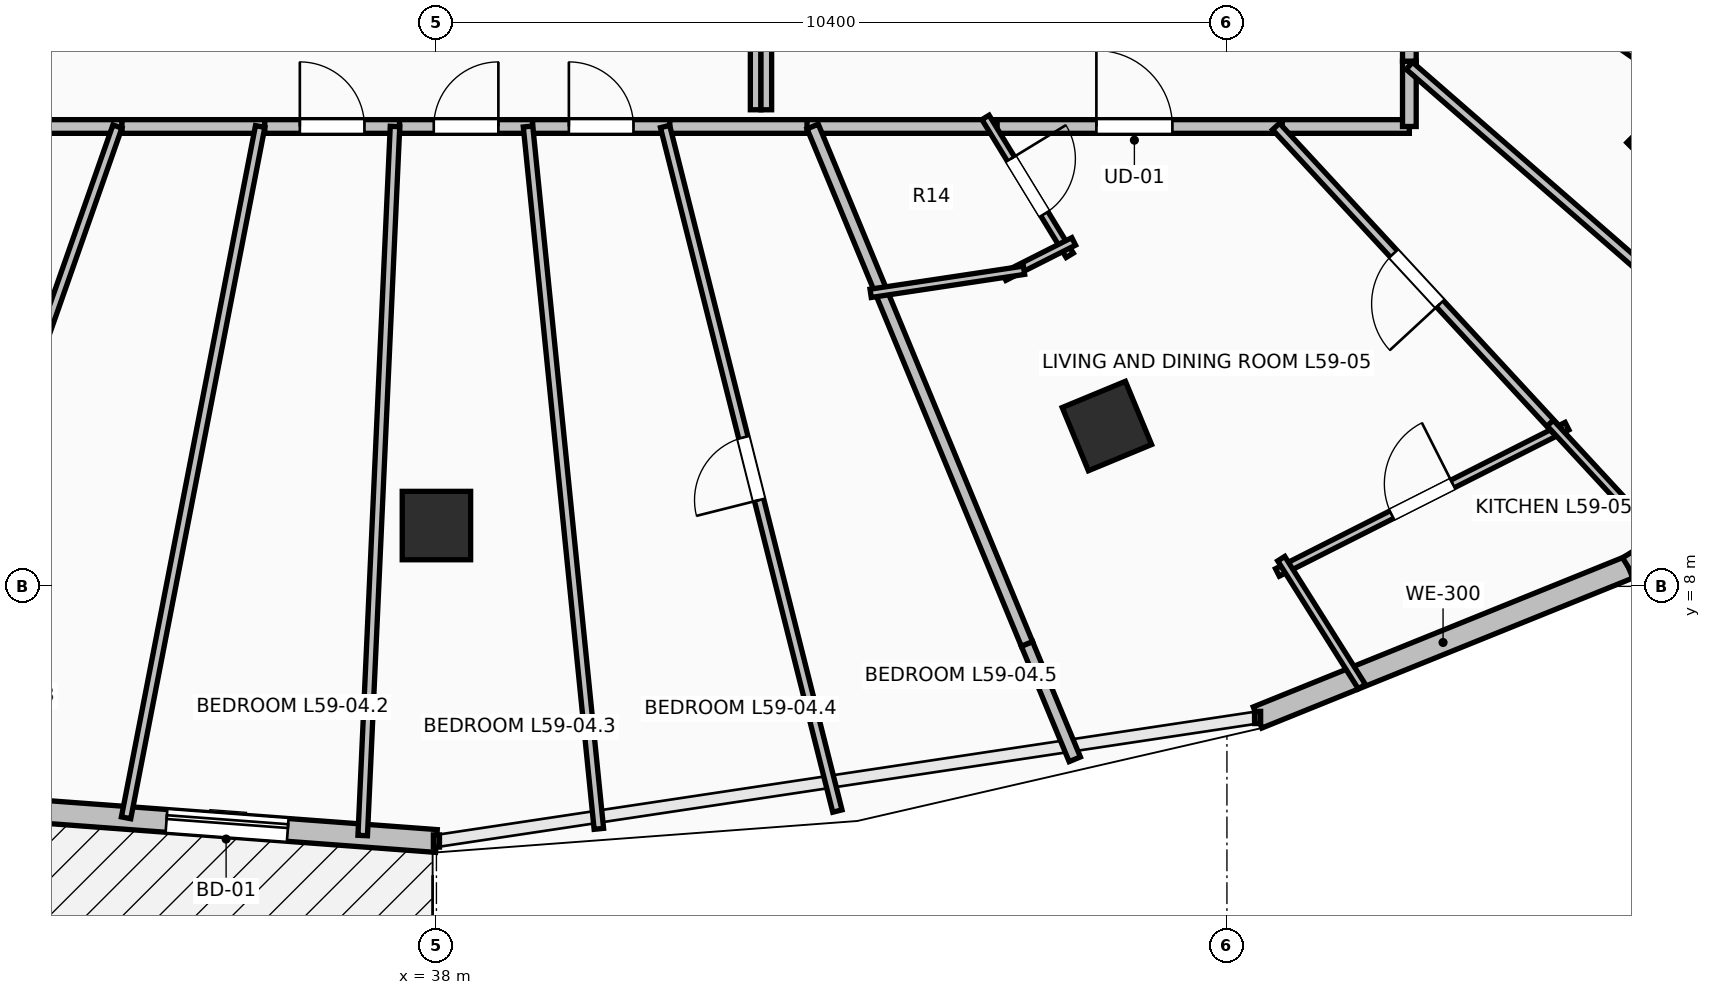
"""IFC4 building model, lengths in metres.
Left out: names, types, materials, properties, quantities, classifications, styles, units other than length and angle.
Written with IfcOpenShell. Run it as: python <this file> out.ifc"""

import sys

from ifc_helpers import new_model, si_unit, direction, frame, frame_2d, origin, origin_2d, place, context, subcontext, project, spatial, rectangle, extrude, element, fill, save


model = new_model("IFC4")
c1 = context("Model", 3, precision=1e-05, world=origin(), true_north=direction((0.0, 1.0)))
c2 = subcontext(c1, "Body", "Model", "MODEL_VIEW")
j1 = project(units=[si_unit("LENGTHUNIT", "METRE"), si_unit("PLANEANGLEUNIT", "RADIAN")], contexts=[c1])
p1 = place(None, origin())
s1 = spatial("IfcSite", under=j1, at=p1, CompositionType="ELEMENT")
p2 = place(p1, origin())
s2 = spatial("IfcBuilding", under=s1, at=p2, CompositionType="ELEMENT")
p3 = place(p2, frame((0.0, 0.0, 217.85)))
s3 = spatial("IfcBuildingStorey", under=s2, at=p3, CompositionType="ELEMENT", Elevation=217.85)
for number, where, z_axis, x_axis in (
    (1, (38.0, 8.8, 0.0), (0.0, 0.0, 1.0), (0.0, -1.0, 0.0)),
    (2, (46.821, 10.109, 0.0), (0.0, 0.0, 1.0), (0.383, -0.924, 0.0)),
    (3, (54.299, 13.838, 0.0), (0.0, 0.0, 1.0), (0.707, -0.707, 0.0)),
):
    element("IfcColumn", number, at=place(p3, frame(where, z_axis=z_axis, x_axis=x_axis)), inside=s3, PredefinedType="COLUMN", context=c2, shape_type="SweptSolid", body=[
        extrude(rectangle(XDim=0.9, YDim=0.9, at=origin_2d()), origin(), (0.0, 0.0, 1.0), 3.55),
    ])
p4 = place(p3, frame((32.493, 5.06, 0.0), z_axis=(0.0, 0.0, 1.0), x_axis=(0.997234968529, -0.074312970214, 0.0)))
e4 = element("IfcWall", 4, at=p4, inside=s3, PredefinedType="STANDARD", context=c2, shape_type="SweptSolid", body=[
    extrude(rectangle(XDim=5.523, YDim=0.3, at=frame_2d((2.761, 0.0))), origin(), (0.0, 0.0, 1.0), 3.29),
])
p5 = place(p4, frame((1.961, 0.0, 0.0)))
e5 = element("IfcOpeningElement", 5, at=p5, cuts=e4, PredefinedType="OPENING", context=c2, shape_type="SweptSolid", body=[
    extrude(rectangle(XDim=1.6, YDim=2.3, at=frame_2d((0.8, 1.15))), frame((0.0, 0.165, 0.0), z_axis=(0.0, -1.0, 0.0), x_axis=(1.0, 0.0, 0.0)), (0.0, 0.0, 1.0), 0.33),
])
p6 = place(p3, frame((48.803, 6.275, 0.0), z_axis=(0.0, 0.0, 1.0), x_axis=(0.927111094334, 0.374786630981, 0.0)))
e6 = element("IfcWall", 6, at=p6, inside=s3, PredefinedType="STANDARD", context=c2, shape_type="SweptSolid", body=[
    extrude(rectangle(XDim=5.264, YDim=0.3, at=frame_2d((2.632, 0.0))), origin(), (0.0, 0.0, 1.0), 3.29),
])
p7 = place(p3, frame((53.684, 8.248, 0.0), z_axis=(0.0, 0.0, 1.0), x_axis=(0.849647657754, 0.527350791858, 0.0)))
e7 = element("IfcWall", 7, at=p7, inside=s3, PredefinedType="STANDARD", context=c2, shape_type="SweptSolid", body=[
    extrude(rectangle(XDim=5.035, YDim=0.3, at=frame_2d((2.518, 0.0))), origin(), (0.0, 0.0, 1.0), 3.29),
])
p8 = place(p7, frame((1.621, 0.0, 0.85)))
e8 = element("IfcOpeningElement", 8, at=p8, cuts=e7, PredefinedType="OPENING", context=c2, shape_type="SweptSolid", body=[
    extrude(rectangle(XDim=1.2, YDim=1.95, at=frame_2d((0.6, 0.975))), frame((0.0, 0.165, 0.0), z_axis=(0.0, -1.0, 0.0), x_axis=(1.0, 0.0, 0.0)), (0.0, 0.0, 1.0), 0.33),
])
p9 = place(p7, frame((3.636, 0.0, 0.85)))
e9 = element("IfcOpeningElement", 9, at=p9, cuts=e7, PredefinedType="OPENING", context=c2, shape_type="SweptSolid", body=[
    extrude(rectangle(XDim=1.2, YDim=1.95, at=frame_2d((0.6, 0.975))), frame((0.0, 0.165, 0.0), z_axis=(0.0, -1.0, 0.0), x_axis=(1.0, 0.0, 0.0)), (0.0, 0.0, 1.0), 0.33),
])
p10 = place(p3, frame((29.954, 14.05, 0.0), z_axis=(0.0, 0.0, 1.0), x_axis=(1.0, 0.0, 0.0)))
e10 = element("IfcWall", 10, at=p10, inside=s3, PredefinedType="PARTITIONING", context=c2, shape_type="SweptSolid", body=[
    extrude(rectangle(XDim=3.909, YDim=0.18, at=frame_2d((1.955, 0.0))), origin(), (0.0, 0.0, 1.0), 2.924),
])
p11 = place(p10, frame((1.455, 0.0, 0.0)))
e11 = element("IfcOpeningElement", 11, at=p11, cuts=e10, PredefinedType="OPENING", context=c2, shape_type="SweptSolid", body=[
    extrude(rectangle(XDim=1.0, YDim=2.15, at=frame_2d((0.5, 1.075))), frame((0.0, 0.105, 0.0), z_axis=(0.0, -1.0, 0.0), x_axis=(1.0, 0.0, 0.0)), (0.0, 0.0, 1.0), 0.21),
])
p12 = place(p3, frame((33.863, 14.05, 0.0), z_axis=(0.0, 0.0, 1.0), x_axis=(1.0, 0.0, 0.0)))
e12 = element("IfcWall", 12, at=p12, inside=s3, PredefinedType="PARTITIONING", context=c2, shape_type="SweptSolid", body=[
    extrude(rectangle(XDim=1.878, YDim=0.18, at=frame_2d((0.939, 0.0))), origin(), (0.0, 0.0, 1.0), 2.924),
])
p13 = place(p3, frame((35.741, 14.05, 0.0), z_axis=(0.0, 0.0, 1.0), x_axis=(1.0, 0.0, 0.0)))
e13 = element("IfcWall", 13, at=p13, inside=s3, PredefinedType="PARTITIONING", context=c2, shape_type="SweptSolid", body=[
    extrude(rectangle(XDim=1.774, YDim=0.18, at=frame_2d((0.887, 0.0))), origin(), (0.0, 0.0, 1.0), 2.924),
])
p14 = place(p13, frame((0.462, 0.0, 0.0)))
e14 = element("IfcOpeningElement", 14, at=p14, cuts=e13, PredefinedType="OPENING", context=c2, shape_type="SweptSolid", body=[
    extrude(rectangle(XDim=0.85, YDim=2.1, at=frame_2d((0.425, 1.05))), frame((0.0, 0.105, 0.0), z_axis=(0.0, -1.0, 0.0), x_axis=(1.0, 0.0, 0.0)), (0.0, 0.0, 1.0), 0.21),
])
p15 = place(p3, frame((37.515, 14.05, 0.0), z_axis=(0.0, 0.0, 1.0), x_axis=(1.0, 0.0, 0.0)))
e15 = element("IfcWall", 15, at=p15, inside=s3, PredefinedType="PARTITIONING", context=c2, shape_type="SweptSolid", body=[
    extrude(rectangle(XDim=1.75, YDim=0.18, at=frame_2d((0.875, 0.0))), origin(), (0.0, 0.0, 1.0), 2.924),
])
p16 = place(p15, frame((0.45, 0.0, 0.0)))
e16 = element("IfcOpeningElement", 16, at=p16, cuts=e15, PredefinedType="OPENING", context=c2, shape_type="SweptSolid", body=[
    extrude(rectangle(XDim=0.85, YDim=2.1, at=frame_2d((0.425, 1.05))), frame((0.0, 0.105, 0.0), z_axis=(0.0, -1.0, 0.0), x_axis=(1.0, 0.0, 0.0)), (0.0, 0.0, 1.0), 0.21),
])
p17 = place(p3, frame((39.265, 14.05, 0.0), z_axis=(0.0, 0.0, 1.0), x_axis=(1.0, 0.0, 0.0)))
e17 = element("IfcWall", 17, at=p17, inside=s3, PredefinedType="PARTITIONING", context=c2, shape_type="SweptSolid", body=[
    extrude(rectangle(XDim=1.805, YDim=0.18, at=frame_2d((0.903, 0.0))), origin(), (0.0, 0.0, 1.0), 3.29),
])
p18 = place(p17, frame((0.478, 0.0, 0.0)))
e18 = element("IfcOpeningElement", 18, at=p18, cuts=e17, PredefinedType="OPENING", context=c2, shape_type="SweptSolid", body=[
    extrude(rectangle(XDim=0.85, YDim=2.1, at=frame_2d((0.425, 1.05))), frame((0.0, 0.105, 0.0), z_axis=(0.0, -1.0, 0.0), x_axis=(1.0, 0.0, 0.0)), (0.0, 0.0, 1.0), 0.21),
])
p19 = place(p3, frame((41.07, 14.05, 0.0), z_axis=(0.0, 0.0, 1.0), x_axis=(1.0, 0.0, 0.0)))
e19 = element("IfcWall", 19, at=p19, inside=s3, PredefinedType="PARTITIONING", context=c2, shape_type="SweptSolid", body=[
    extrude(rectangle(XDim=1.945, YDim=0.18, at=frame_2d((0.972, 0.0))), origin(), (0.0, 0.0, 1.0), 3.29),
])
p20 = place(p3, frame((45.237, 14.05, 0.0), z_axis=(0.0, 0.0, 1.0), x_axis=(1.0, 0.0, 0.0)))
e20 = element("IfcWall", 20, at=p20, inside=s3, PredefinedType="PARTITIONING", context=c2, shape_type="SweptSolid", body=[
    extrude(rectangle(XDim=3.891, YDim=0.18, at=frame_2d((1.945, 0.0))), origin(), (0.0, 0.0, 1.0), 2.482),
])
p21 = place(p20, frame((1.446, 0.0, 0.0)))
e21 = element("IfcOpeningElement", 21, at=p21, cuts=e20, PredefinedType="OPENING", context=c2, shape_type="SweptSolid", body=[
    extrude(rectangle(XDim=1.0, YDim=2.15, at=frame_2d((0.5, 1.075))), frame((0.0, 0.105, 0.0), z_axis=(0.0, -1.0, 0.0), x_axis=(1.0, 0.0, 0.0)), (0.0, 0.0, 1.0), 0.21),
])
p22 = place(p3, frame((42.875, 14.05, 0.0), z_axis=(0.0, 0.0, 1.0), x_axis=(1.0, 0.0, 0.0)))
e22 = element("IfcWall", 22, at=p22, inside=s3, PredefinedType="PARTITIONING", context=c2, shape_type="SweptSolid", body=[
    extrude(rectangle(XDim=2.502, YDim=0.18, at=frame_2d((1.251, 0.0))), origin(), (0.0, 0.0, 1.0), 2.482),
])
p23 = place(p3, frame((49.128, 14.05, 0.0), z_axis=(0.0, 0.0, 1.0), x_axis=(1.0, 0.0, 0.0)))
e23 = element("IfcWall", 23, at=p23, inside=s3, PredefinedType="PARTITIONING", context=c2, shape_type="SweptSolid", body=[
    extrude(rectangle(XDim=1.672, YDim=0.18, at=frame_2d((0.836, 0.0))), origin(), (0.0, 0.0, 1.0), 2.979),
])
p24 = place(p3, frame((50.8, 14.05, 0.0), z_axis=(0.0, 0.0, 1.0), x_axis=(0.0, 1.0, 0.0)))
e24 = element("IfcWall", 24, at=p24, inside=s3, PredefinedType="PARTITIONING", context=c2, shape_type="SweptSolid", body=[
    extrude(rectangle(XDim=0.859, YDim=0.18, at=frame_2d((0.429, 0.0))), origin(), (0.0, 0.0, 1.0), 2.979),
])
p25 = place(p3, frame((50.8, 14.909, 0.0), z_axis=(0.0, 0.0, 1.0), x_axis=(0.0, 1.0, 0.0)))
e25 = element("IfcWall", 25, at=p25, inside=s3, PredefinedType="PARTITIONING", context=c2, shape_type="SweptSolid", body=[
    extrude(rectangle(XDim=2.23, YDim=0.18, at=frame_2d((1.115, 0.0))), origin(), (0.0, 0.0, 1.0), 2.482),
])
p26 = place(p25, frame((0.69, 0.0, 0.0)))
e26 = element("IfcOpeningElement", 26, at=p26, cuts=e25, PredefinedType="OPENING", context=c2, shape_type="SweptSolid", body=[
    extrude(rectangle(XDim=0.85, YDim=2.1, at=frame_2d((0.425, 1.05))), frame((0.0, 0.105, 0.0), z_axis=(0.0, -1.0, 0.0), x_axis=(1.0, 0.0, 0.0)), (0.0, 0.0, 1.0), 0.21),
])
p27 = place(p3, frame((31.381, 7.152, 0.0), z_axis=(0.0, 0.0, 1.0), x_axis=(0.331275500224, 0.943534070901, 0.0)))
e27 = element("IfcWall", 27, at=p27, inside=s3, PredefinedType="PARTITIONING", context=c2, shape_type="SweptSolid", body=[
    extrude(rectangle(XDim=7.311, YDim=0.125, at=frame_2d((3.655, 0.0))), origin(), (0.0, 0.0, 1.0), 2.824),
])
p28 = place(p27, frame((3.205, 0.0, 0.0)))
e28 = element("IfcOpeningElement", 28, at=p28, cuts=e27, PredefinedType="OPENING", context=c2, shape_type="SweptSolid", body=[
    extrude(rectangle(XDim=0.9, YDim=2.1, at=frame_2d((0.45, 1.05))), frame((0.0, 0.077, 0.0), z_axis=(0.0, -1.0, 0.0), x_axis=(1.0, 0.0, 0.0)), (0.0, 0.0, 1.0), 0.155),
])
p29 = place(p3, frame((33.917, 4.955, 0.0), z_axis=(0.0, 0.0, 1.0), x_axis=(0.190396351082, 0.981707303372, 0.0)))
e29 = element("IfcWall", 29, at=p29, inside=s3, PredefinedType="PARTITIONING", context=c2, shape_type="SweptSolid", body=[
    extrude(rectangle(XDim=9.264, YDim=0.125, at=frame_2d((4.632, 0.0))), origin(), (0.0, 0.0, 1.0), 2.824),
])
p30 = place(p3, frame((37.03, 4.722, 0.0), z_axis=(0.0, 0.0, 1.0), x_axis=(0.045519142468, 0.998963466634, 0.0)))
e30 = element("IfcWall", 30, at=p30, inside=s3, PredefinedType="PARTITIONING", context=c2, shape_type="SweptSolid", body=[
    extrude(rectangle(XDim=9.338, YDim=0.125, at=frame_2d((4.669, 0.0))), origin(), (0.0, 0.0, 1.0), 2.824),
])
p31 = place(p3, frame((40.137, 4.81, 0.0), z_axis=(0.0, 0.0, 1.0), x_axis=(-0.100344404998, 0.994952762892, 0.0)))
e31 = element("IfcWall", 31, at=p31, inside=s3, PredefinedType="PARTITIONING", context=c2, shape_type="SweptSolid", body=[
    extrude(rectangle(XDim=9.287, YDim=0.125, at=frame_2d((4.644, 0.0))), origin(), (0.0, 0.0, 1.0), 2.482),
])
p32 = place(p3, frame((43.275, 5.044, 0.0), z_axis=(0.0, 0.0, 1.0), x_axis=(-0.244087876961, 0.969753117201, 0.0)))
e32 = element("IfcWall", 32, at=p32, inside=s3, PredefinedType="PARTITIONING", context=c2, shape_type="SweptSolid", body=[
    extrude(rectangle(XDim=9.287, YDim=0.125, at=frame_2d((4.644, 0.0))), origin(), (0.0, 0.0, 1.0), 2.482),
])
p33 = place(p32, frame((4.219, 0.0, 0.0)))
e33 = element("IfcOpeningElement", 33, at=p33, cuts=e32, PredefinedType="OPENING", context=c2, shape_type="SweptSolid", body=[
    extrude(rectangle(XDim=0.85, YDim=2.1, at=frame_2d((0.425, 1.05))), frame((0.0, 0.077, 0.0), z_axis=(0.0, -1.0, 0.0), x_axis=(1.0, 0.0, 0.0)), (0.0, 0.0, 1.0), 0.155),
])
p34 = place(p3, frame((46.398, 5.725, 0.0), z_axis=(0.0, 0.0, 1.0), x_axis=(-0.382789247432, 0.923835695376, 0.0)))
e34 = element("IfcWall", 34, at=p34, inside=s3, PredefinedType="PARTITIONING", context=c2, shape_type="SweptSolid", body=[
    extrude(rectangle(XDim=1.643, YDim=0.16, at=frame_2d((0.822, 0.0))), origin(), (0.0, 0.0, 1.0), 3.29),
])
p35 = place(p3, frame((45.769, 7.243, 0.0), z_axis=(0.0, 0.0, 1.0), x_axis=(-0.382623964136, 0.923904162816, 0.0)))
e35 = element("IfcWall", 35, at=p35, inside=s3, PredefinedType="PARTITIONING", context=c2, shape_type="SweptSolid", body=[
    extrude(rectangle(XDim=7.368, YDim=0.16, at=frame_2d((3.684, 0.0))), origin(), (0.0, 0.0, 1.0), 2.482),
])
p36 = place(p3, frame((45.224, 14.169, 0.0), z_axis=(0.0, 0.0, 1.0), x_axis=(0.52123627541, -0.853412412141, 0.0)))
e36 = element("IfcWall", 36, at=p36, inside=s3, PredefinedType="PARTITIONING", context=c2, shape_type="SweptSolid", body=[
    extrude(rectangle(XDim=2.125, YDim=0.11, at=frame_2d((1.063, 0.0))), origin(), (0.0, 0.0, 1.0), 2.482),
])
p37 = place(p36, frame((0.638, 0.0, 0.0)))
e37 = element("IfcOpeningElement", 37, at=p37, cuts=e36, PredefinedType="OPENING", context=c2, shape_type="SweptSolid", body=[
    extrude(rectangle(XDim=0.85, YDim=2.1, at=frame_2d((0.425, 1.05))), frame((0.0, 0.07, 0.0), z_axis=(0.0, -1.0, 0.0), x_axis=(1.0, 0.0, 0.0)), (0.0, 0.0, 1.0), 0.14),
])
p38 = place(p3, frame((46.384, 12.538, 0.0), z_axis=(0.0, 0.0, 1.0), x_axis=(-0.892613755874, -0.450822229737, 0.0)))
e38 = element("IfcWall", 38, at=p38, inside=s3, PredefinedType="PARTITIONING", context=c2, shape_type="SweptSolid", body=[
    extrude(rectangle(XDim=1.027, YDim=0.11, at=frame_2d((0.514, 0.0))), origin(), (0.0, 0.0, 1.0), 2.979),
])
p39 = place(p3, frame((45.73, 12.159, 0.0), z_axis=(0.0, 0.0, 1.0), x_axis=(-0.98887923552, -0.148720736812, 0.0)))
e39 = element("IfcWall", 39, at=p39, inside=s3, PredefinedType="PARTITIONING", context=c2, shape_type="SweptSolid", body=[
    extrude(rectangle(XDim=2.041, YDim=0.11, at=frame_2d((1.02, 0.0))), origin(), (0.0, 0.0, 1.0), 2.979),
])
p40 = place(p3, frame((49.064, 8.183, 0.0), z_axis=(0.0, 0.0, 1.0), x_axis=(0.892520393298, 0.451007037136, 0.0)))
e40 = element("IfcWall", 40, at=p40, inside=s3, PredefinedType="PARTITIONING", context=c2, shape_type="SweptSolid", body=[
    extrude(rectangle(XDim=4.269, YDim=0.11, at=frame_2d((2.134, 0.0))), origin(), (0.0, 0.0, 1.0), 3.29),
])
p41 = place(p40, frame((1.684, 0.0, 0.0)))
e41 = element("IfcOpeningElement", 41, at=p41, cuts=e40, PredefinedType="OPENING", context=c2, shape_type="SweptSolid", body=[
    extrude(rectangle(XDim=0.9, YDim=2.1, at=frame_2d((0.45, 1.05))), frame((0.0, 0.07, 0.0), z_axis=(0.0, -1.0, 0.0), x_axis=(1.0, 0.0, 0.0)), (0.0, 0.0, 1.0), 0.14),
])
p42 = place(p3, frame((50.175, 6.681, 0.0), z_axis=(0.0, 0.0, 1.0), x_axis=(-0.532930456912, 0.846159044208, 0.0)))
e42 = element("IfcWall", 42, at=p42, inside=s3, PredefinedType="PARTITIONING", context=c2, shape_type="SweptSolid", body=[
    extrude(rectangle(XDim=1.989, YDim=0.11, at=frame_2d((0.995, 0.0))), origin(), (0.0, 0.0, 1.0), 3.29),
])
p43 = place(p3, frame((52.749, 10.045, 0.0), z_axis=(0.0, 0.0, 1.0), x_axis=(-0.678882171058, 0.734247232081, 0.0)))
e43 = element("IfcWall", 43, at=p43, inside=s3, PredefinedType="PARTITIONING", context=c2, shape_type="SweptSolid", body=[
    extrude(rectangle(XDim=5.455, YDim=0.125, at=frame_2d((2.728, 0.0))), origin(), (0.0, 0.0, 1.0), 2.824),
])
p44 = place(p43, frame((2.277, 0.0, 0.0)))
e44 = element("IfcOpeningElement", 44, at=p44, cuts=e43, PredefinedType="OPENING", context=c2, shape_type="SweptSolid", body=[
    extrude(rectangle(XDim=0.9, YDim=2.1, at=frame_2d((0.45, 1.05))), frame((0.0, 0.077, 0.0), z_axis=(0.0, -1.0, 0.0), x_axis=(1.0, 0.0, 0.0)), (0.0, 0.0, 1.0), 0.155),
])
p45 = place(p3, frame((54.24, 8.432, 0.0), z_axis=(0.0, 0.0, 1.0), x_axis=(-0.678818101482, 0.734306465381, 0.0)))
e45 = element("IfcWall", 45, at=p45, inside=s3, PredefinedType="PARTITIONING", context=c2, shape_type="SweptSolid", body=[
    extrude(rectangle(XDim=2.336, YDim=0.11, at=frame_2d((1.168, 0.0))), origin(), (0.0, 0.0, 1.0), 3.29),
])
p46 = place(p3, frame((56.422, 9.951, 0.0), z_axis=(0.0, 0.0, 1.0), x_axis=(-0.753978537067, 0.656899052856, 0.0)))
e46 = element("IfcWall", 46, at=p46, inside=s3, PredefinedType="PARTITIONING", context=c2, shape_type="SweptSolid", body=[
    extrude(rectangle(XDim=7.457, YDim=0.125, at=frame_2d((3.728, 0.0))), origin(), (0.0, 0.0, 1.0), 2.824),
])
p47 = place(p3, frame((58.692, 11.578, 0.0), z_axis=(0.0, 0.0, 1.0), x_axis=(-0.820357038452, 0.571851667361, 0.0)))
e47 = element("IfcWall", 47, at=p47, inside=s3, PredefinedType="PARTITIONING", context=c2, shape_type="SweptSolid", body=[
    extrude(rectangle(XDim=9.62, YDim=0.125, at=frame_2d((4.81, 0.0))), origin(), (0.0, 0.0, 1.0), 2.824),
])
p48 = place(p3, frame((60.8, 13.524, 0.0), z_axis=(0.0, 0.0, 1.0), x_axis=(-0.877244884683, 0.480043135871, 0.0)))
e48 = element("IfcWall", 48, at=p48, inside=s3, PredefinedType="PARTITIONING", context=c2, shape_type="SweptSolid", body=[
    extrude(rectangle(XDim=11.399, YDim=0.125, at=frame_2d((5.7, 0.0))), origin(), (0.0, 0.0, 1.0), 2.824),
])
for number, where, z_axis, x_axis in (
    (49, (42.2, 16.1, 0.0), (0.0, 0.0, 1.0), (0.0, -1.0, 0.0)),
    (50, (42.34, 14.27, 0.0), (0.0, 0.0, 1.0), (0.0, 1.0, 0.0)),
):
    element("IfcWall", number, at=place(p3, frame(where, z_axis=z_axis, x_axis=x_axis)), inside=s3, PredefinedType="PARTITIONING", context=c2, shape_type="SweptSolid", body=[
        extrude(rectangle(XDim=1.83, YDim=0.14, at=frame_2d((0.915, 0.0))), origin(), (0.0, 0.0, 1.0), 3.29),
    ])
p49 = place(p5, origin())
e51 = element("IfcDoor", 51, at=p49, inside=s3, OperationType="SLIDING_TO_LEFT", PredefinedType="DOOR", context=c2, shape_type="SweptSolid", body=[
    extrude(rectangle(XDim=1.6, YDim=2.3, at=frame_2d((0.8, 1.15))), frame((0.0, 0.025, 0.0), z_axis=(0.0, -1.0, 0.0), x_axis=(1.0, 0.0, 0.0)), (0.0, 0.0, 1.0), 0.05),
])
fill(e5, e51)
p50 = place(p21, origin())
e52 = element("IfcDoor", 52, at=p50, inside=s3, OperationType="SINGLE_SWING_LEFT", PredefinedType="DOOR", context=c2, shape_type="SweptSolid", body=[
    extrude(rectangle(XDim=1.0, YDim=2.15, at=frame_2d((0.5, 1.075))), frame((0.0, 0.025, 0.0), z_axis=(0.0, -1.0, 0.0), x_axis=(1.0, 0.0, 0.0)), (0.0, 0.0, 1.0), 0.05),
])
fill(e21, e52)
p51 = place(p37, origin())
e53 = element("IfcDoor", 53, at=p51, inside=s3, OperationType="SINGLE_SWING_LEFT", PredefinedType="DOOR", context=c2, shape_type="SweptSolid", body=[
    extrude(rectangle(XDim=0.85, YDim=2.1, at=frame_2d((0.425, 1.05))), frame((0.0, 0.025, 0.0), z_axis=(0.0, -1.0, 0.0), x_axis=(1.0, 0.0, 0.0)), (0.0, 0.0, 1.0), 0.05),
])
fill(e37, e53)
p52 = place(p41, origin())
e54 = element("IfcDoor", 54, at=p52, inside=s3, OperationType="SINGLE_SWING_RIGHT", PredefinedType="DOOR", context=c2, shape_type="SweptSolid", body=[
    extrude(rectangle(XDim=0.9, YDim=2.1, at=frame_2d((0.45, 1.05))), frame((0.0, 0.025, 0.0), z_axis=(0.0, -1.0, 0.0), x_axis=(1.0, 0.0, 0.0)), (0.0, 0.0, 1.0), 0.05),
])
fill(e41, e54)
p53 = place(p44, origin())
e55 = element("IfcDoor", 55, at=p53, inside=s3, OperationType="SINGLE_SWING_LEFT", PredefinedType="DOOR", context=c2, shape_type="SweptSolid", body=[
    extrude(rectangle(XDim=0.9, YDim=2.1, at=frame_2d((0.45, 1.05))), frame((0.0, 0.025, 0.0), z_axis=(0.0, -1.0, 0.0), x_axis=(1.0, 0.0, 0.0)), (0.0, 0.0, 1.0), 0.05),
])
fill(e44, e55)
p54 = place(p14, origin())
e56 = element("IfcDoor", 56, at=p54, inside=s3, OperationType="SINGLE_SWING_LEFT", PredefinedType="DOOR", context=c2, shape_type="SweptSolid", body=[
    extrude(rectangle(XDim=0.85, YDim=2.1, at=frame_2d((0.425, 1.05))), frame((0.0, 0.025, 0.0), z_axis=(0.0, -1.0, 0.0), x_axis=(1.0, 0.0, 0.0)), (0.0, 0.0, 1.0), 0.05),
])
fill(e14, e56)
p55 = place(p16, origin())
e57 = element("IfcDoor", 57, at=p55, inside=s3, OperationType="SINGLE_SWING_RIGHT", PredefinedType="DOOR", context=c2, shape_type="SweptSolid", body=[
    extrude(rectangle(XDim=0.85, YDim=2.1, at=frame_2d((0.425, 1.05))), frame((0.0, 0.025, 0.0), z_axis=(0.0, -1.0, 0.0), x_axis=(1.0, 0.0, 0.0)), (0.0, 0.0, 1.0), 0.05),
])
fill(e16, e57)
p56 = place(p18, origin())
e58 = element("IfcDoor", 58, at=p56, inside=s3, OperationType="SINGLE_SWING_LEFT", PredefinedType="DOOR", context=c2, shape_type="SweptSolid", body=[
    extrude(rectangle(XDim=0.85, YDim=2.1, at=frame_2d((0.425, 1.05))), frame((0.0, 0.025, 0.0), z_axis=(0.0, -1.0, 0.0), x_axis=(1.0, 0.0, 0.0)), (0.0, 0.0, 1.0), 0.05),
])
fill(e18, e58)
p57 = place(p33, origin())
e59 = element("IfcDoor", 59, at=p57, inside=s3, OperationType="SINGLE_SWING_LEFT", PredefinedType="DOOR", context=c2, shape_type="SweptSolid", body=[
    extrude(rectangle(XDim=0.85, YDim=2.1, at=frame_2d((0.425, 1.05))), frame((0.0, 0.025, 0.0), z_axis=(0.0, -1.0, 0.0), x_axis=(1.0, 0.0, 0.0)), (0.0, 0.0, 1.0), 0.05),
])
fill(e33, e59)
save(model, sys.argv[1])
